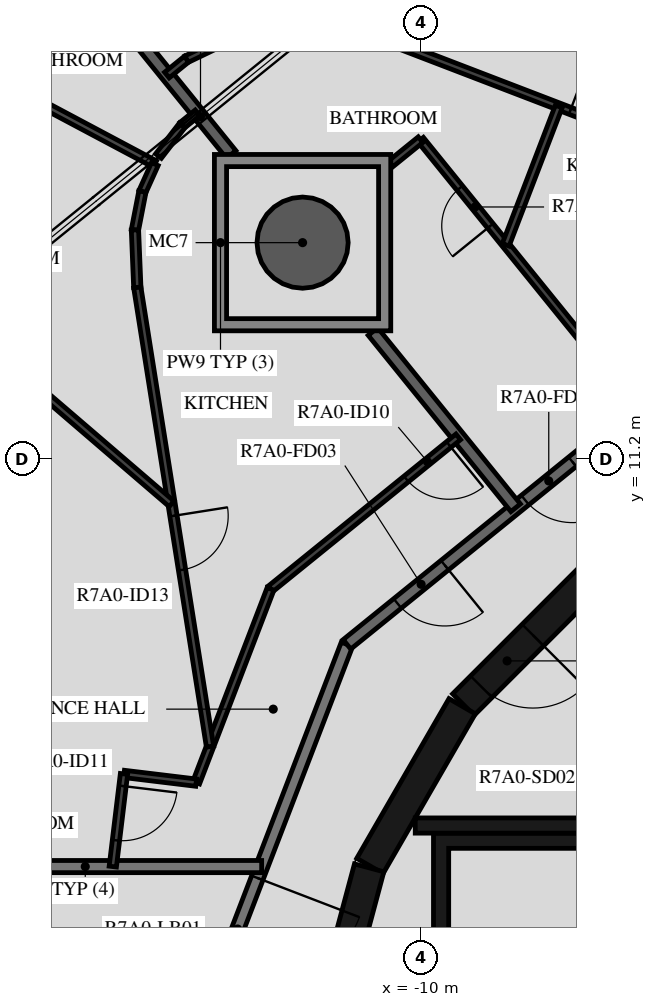
"""IFC4 building model, lengths in metres.
Left out: names, types, materials, properties, quantities, classifications, styles, units other than length and angle.
Written with IfcOpenShell. Run it as: python <this file> out.ifc"""

import sys

from ifc_helpers import new_model, si_unit, direction, frame, frame_2d, origin, origin_2d, place, context, subcontext, project, spatial, polyline, rectangle, hollow_circle, outline, extrude, element, fill, save


model = new_model("IFC4")
c1 = context("Model", 3, precision=1e-05, world=origin(), true_north=direction((0.0, 1.0)))
c2 = subcontext(c1, "Body", "Model", "MODEL_VIEW")
j1 = project(units=[si_unit("LENGTHUNIT", "METRE"), si_unit("PLANEANGLEUNIT", "RADIAN")], contexts=[c1])
p1 = place(None, origin())
s1 = spatial("IfcSite", under=j1, at=p1, CompositionType="ELEMENT")
p2 = place(p1, origin())
s2 = spatial("IfcBuilding", under=s1, at=p2, CompositionType="ELEMENT")
p3 = place(p2, frame((0.0, 0.0, 263.4)))
s3 = spatial("IfcBuildingStorey", under=s2, at=p3, CompositionType="ELEMENT", Elevation=263.4)
p4 = place(p3, frame((-11.953, 14.76, -0.45), z_axis=(0.0, 0.0, 1.0), x_axis=(1.0, 0.0, 0.0)))
e1 = element("IfcColumn", 1, at=p4, inside=s3, PredefinedType="COLUMN", context=c2, shape_type="SweptSolid", body=[
    extrude(hollow_circle(Radius=0.75, WallThickness=0.035, at=origin_2d()), origin(), (0.0, 0.0, 1.0), 3.57),
])
p5 = place(p3, frame((-7.164, 9.308, 0.0), z_axis=(0.0, 0.0, 1.0), x_axis=(-0.707106781187, -0.707106781187, 0.0)))
e2 = element("IfcWall", 2, at=p5, inside=s3, PredefinedType="SHEAR", context=c2, shape_type="SweptSolid", body=[
    extrude(rectangle(XDim=3.032, YDim=0.5, at=frame_2d((1.516, 0.0))), origin(), (0.0, 0.0, 1.0), 3.12),
])
p6 = place(p5, frame((1.416, 0.0, 0.0)))
e3 = element("IfcOpeningElement", 3, at=p6, cuts=e2, PredefinedType="OPENING", context=c2, shape_type="SweptSolid", body=[
    extrude(rectangle(XDim=1.2, YDim=2.1, at=frame_2d((0.6, 1.05))), frame((0.0, 0.26, 0.0), z_axis=(0.0, -1.0, 0.0), x_axis=(1.0, 0.0, 0.0)), (0.0, 0.0, 1.0), 0.52),
])
for number, where, z_axis, x_axis in (
    (4, (-9.329, 7.137, 0.0), (0.0, 0.0, 1.0), (-0.5, -0.866, 0.0)),
    (5, (-10.858, 4.479, 0.0), (0.0, 0.0, 1.0), (-0.259, -0.966, 0.0)),
):
    element("IfcWall", number, at=place(p3, frame(where, z_axis=z_axis, x_axis=x_axis)), inside=s3, PredefinedType="SHEAR", context=c2, shape_type="SweptSolid", body=[
        extrude(rectangle(XDim=3.033, YDim=0.5, at=frame_2d((1.516, 0.0))), origin(), (0.0, 0.0, 1.0), 3.12),
    ])
p7 = place(p3, frame((-7.0, 5.175, 0.0), z_axis=(0.0, 0.0, 1.0), x_axis=(-1.0, 0.0, 0.0)))
e6 = element("IfcWall", 6, at=p7, inside=s3, PredefinedType="SHEAR", context=c2, shape_type="SweptSolid", body=[
    extrude(rectangle(XDim=3.1, YDim=0.25, at=frame_2d((1.55, 0.0))), origin(), (0.0, 0.0, 1.0), 3.12),
])
p8 = place(p3, origin())
e7 = element("IfcWall", 7, at=p8, inside=s3, PredefinedType="SHEAR", context=c2, shape_type="SweptSolid", body=[
    extrude(outline(polyline([(-9.8, 1.9), (-9.55, 1.9), (-9.55, 4.8), (3.1, 4.8), (3.1, 1.9), (3.35, 1.9), (3.35, 4.8), (5.25, 4.8), (5.25, 1.9), (5.5, 1.9), (5.5, 4.8), (7.4, 4.8), (7.4, 1.9), (7.65, 1.9), (7.65, 4.8), (9.55, 4.8), (9.55, 1.9), (9.8, 1.9), (9.8, 4.8), (9.8, 5.05), (-9.8, 5.05), (-9.8, 4.8), (-9.8, 1.9)])), origin(), (0.0, 0.0, 1.0), 3.12),
])
p9 = place(p3, frame((-11.223, 8.154, 0.0), z_axis=(0.0, 0.0, 1.0), x_axis=(-0.358341090983, -0.93359073609, 0.0)))
e8 = element("IfcWall", 8, at=p9, inside=s3, PredefinedType="STANDARD", context=c2, shape_type="SweptSolid", body=[
    extrude(rectangle(XDim=7.181, YDim=0.2, at=frame_2d((3.59, 0.0))), origin(), (0.0, 0.0, 1.0), 3.12),
])
p10 = place(p9, frame((4.114, 0.0, 0.0)))
e9 = element("IfcOpeningElement", 9, at=p10, cuts=e8, PredefinedType="OPENING", context=c2, shape_type="SweptSolid", body=[
    extrude(rectangle(XDim=1.8, YDim=2.1, at=frame_2d((0.9, 1.05))), frame((0.0, 0.11, 0.0), z_axis=(0.0, -1.0, 0.0), x_axis=(1.0, 0.0, 0.0)), (0.0, 0.0, 1.0), 0.22),
])
p11 = place(p3, frame((-5.643, 12.673, 0.0), z_axis=(0.0, 0.0, 1.0), x_axis=(-0.777160148113, -0.629302871585, 0.0)))
e10 = element("IfcWall", 10, at=p11, inside=s3, PredefinedType="STANDARD", context=c2, shape_type="SweptSolid", body=[
    extrude(rectangle(XDim=7.181, YDim=0.2, at=frame_2d((3.59, 0.0))), origin(), (0.0, 0.0, 1.0), 3.12),
])
p12 = place(p11, frame((2.41, 0.0, 0.0)))
e11 = element("IfcOpeningElement", 11, at=p12, cuts=e10, PredefinedType="OPENING", context=c2, shape_type="SweptSolid", body=[
    extrude(rectangle(XDim=1.0, YDim=2.1, at=frame_2d((0.5, 1.05))), frame((0.0, 0.11, 0.0), z_axis=(0.0, -1.0, 0.0), x_axis=(1.0, 0.0, 0.0)), (0.0, 0.0, 1.0), 0.22),
])
p13 = place(p11, frame((5.112, 0.0, 0.0)))
e12 = element("IfcOpeningElement", 12, at=p13, cuts=e10, PredefinedType="OPENING", context=c2, shape_type="SweptSolid", body=[
    extrude(rectangle(XDim=1.0, YDim=2.1, at=frame_2d((0.5, 1.05))), frame((0.0, 0.11, 0.0), z_axis=(0.0, -1.0, 0.0), x_axis=(1.0, 0.0, 0.0)), (0.0, 0.0, 1.0), 0.22),
])
p14 = place(p3, frame((-12.626, 4.5, 0.0), z_axis=(0.0, 0.0, 1.0), x_axis=(-1.0, 0.0, 0.0)))
e13 = element("IfcWall", 13, at=p14, inside=s3, PredefinedType="STANDARD", context=c2, shape_type="SweptSolid", body=[
    extrude(rectangle(XDim=5.802, YDim=0.2, at=frame_2d((2.901, 0.0))), origin(), (0.0, 0.0, 1.0), 3.12),
])
p15 = place(p3, frame((-10.796, 13.299, 0.0), z_axis=(0.0, 0.0, 1.0), x_axis=(0.629290499381, -0.777170166301, 0.0)))
e14 = element("IfcWall", 14, at=p15, inside=s3, PredefinedType="STANDARD", context=c2, shape_type="SweptSolid", body=[
    extrude(rectangle(XDim=3.729, YDim=0.2, at=frame_2d((1.865, 0.0))), origin(), (0.0, 0.0, 1.0), 3.12),
])
p16 = place(p3, frame((-16.953, 20.936, 0.0), z_axis=(0.0, 0.0, 1.0), x_axis=(0.629331057166, -0.777137324085, 0.0)))
e15 = element("IfcWall", 15, at=p16, inside=s3, PredefinedType="STANDARD", context=c2, shape_type="SweptSolid", body=[
    extrude(rectangle(XDim=6.08, YDim=0.2, at=frame_2d((3.04, 0.0))), origin(), (0.0, 0.0, 1.0), 3.12),
])
p17 = place(p3, frame((-7.377, 13.199, 0.0), z_axis=(0.0, 0.0, 1.0), x_axis=(-0.629382670352, 0.77709552454, 0.0)))
e16 = element("IfcWall", 16, at=p17, inside=s3, PredefinedType="PARTITIONING", context=c2, shape_type="SweptSolid", body=[
    extrude(rectangle(XDim=4.188, YDim=0.12, at=frame_2d((2.094, 0.0))), origin(), (0.0, 0.0, 1.0), 3.12),
])
p18 = place(p17, frame((2.364, 0.0, 0.0)))
e17 = element("IfcOpeningElement", 17, at=p18, cuts=e16, PredefinedType="OPENING", context=c2, shape_type="SweptSolid", body=[
    extrude(rectangle(XDim=0.8, YDim=2.1, at=frame_2d((0.4, 1.05))), frame((0.0, 0.07, 0.0), z_axis=(0.0, -1.0, 0.0), x_axis=(1.0, 0.0, 0.0)), (0.0, 0.0, 1.0), 0.14),
])
p19 = place(p3, frame((-10.013, 16.454, 0.0), z_axis=(0.0, 0.0, 1.0), x_axis=(-0.777001388062, -0.629498882406, 0.0)))
e18 = element("IfcWall", 18, at=p19, inside=s3, PredefinedType="PARTITIONING", context=c2, shape_type="SweptSolid", body=[
    extrude(rectangle(XDim=0.631, YDim=0.12, at=frame_2d((0.315, 0.0))), origin(), (0.0, 0.0, 1.0), 3.12),
])
p20 = place(p3, frame((-10.289, 17.978, 0.0), z_axis=(0.0, 0.0, 1.0), x_axis=(0.933579293595, -0.358370900844, 0.0)))
e19 = element("IfcWall", 19, at=p20, inside=s3, PredefinedType="PARTITIONING", context=c2, shape_type="SweptSolid", body=[
    extrude(rectangle(XDim=8.932, YDim=0.12, at=frame_2d((4.466, 0.0))), origin(), (0.0, 0.0, 1.0), 3.12),
])
p21 = place(p20, frame((2.93, 0.0, 0.0)))
e20 = element("IfcOpeningElement", 20, at=p21, cuts=e19, PredefinedType="OPENING", context=c2, shape_type="SweptSolid", body=[
    extrude(rectangle(XDim=0.9, YDim=2.1, at=frame_2d((0.45, 1.05))), frame((0.0, 0.07, 0.0), z_axis=(0.0, -1.0, 0.0), x_axis=(1.0, 0.0, 0.0)), (0.0, 0.0, 1.0), 0.14),
])
p22 = place(p3, frame((-7.74, 17.0, 0.0), z_axis=(0.0, 0.0, 1.0), x_axis=(-0.358394723652, -0.93357014844, 0.0)))
e21 = element("IfcWall", 21, at=p22, inside=s3, PredefinedType="PARTITIONING", context=c2, shape_type="SweptSolid", body=[
    extrude(rectangle(XDim=2.436, YDim=0.12, at=frame_2d((1.218, 0.0))), origin(), (0.0, 0.0, 1.0), 3.12),
])
p23 = place(p3, frame((-13.115, 18.136, 0.0), z_axis=(0.0, 0.0, 1.0), x_axis=(-0.901385111422, -0.43301833784, 0.0)))
e22 = element("IfcWall", 22, at=p23, inside=s3, PredefinedType="PARTITIONING", context=c2, shape_type="SweptSolid", body=[
    extrude(rectangle(XDim=0.829, YDim=0.12, at=frame_2d((0.415, 0.0))), origin(), (0.0, 0.0, 1.0), 3.12),
])
p24 = place(p3, frame((-13.862, 17.777, 0.0), z_axis=(0.0, 0.0, 1.0), x_axis=(-0.776888119785, -0.629638665694, 0.0)))
e23 = element("IfcWall", 23, at=p24, inside=s3, PredefinedType="PARTITIONING", context=c2, shape_type="SweptSolid", body=[
    extrude(rectangle(XDim=0.415, YDim=0.12, at=frame_2d((0.207, 0.0))), origin(), (0.0, 0.0, 1.0), 3.12),
])
p25 = place(p3, frame((-9.393, 11.566, 0.0), z_axis=(0.0, 0.0, 1.0), x_axis=(-0.777100258587, -0.629376825205, 0.0)))
e24 = element("IfcWall", 24, at=p25, inside=s3, PredefinedType="PARTITIONING", context=c2, shape_type="SweptSolid", body=[
    extrude(rectangle(XDim=3.971, YDim=0.12, at=frame_2d((1.986, 0.0))), origin(), (0.0, 0.0, 1.0), 3.12),
])
p26 = place(p25, frame((0.2, 0.0, 0.0)))
e25 = element("IfcOpeningElement", 25, at=p26, cuts=e24, PredefinedType="OPENING", context=c2, shape_type="SweptSolid", body=[
    extrude(rectangle(XDim=0.9, YDim=2.1, at=frame_2d((0.45, 1.05))), frame((0.0, 0.07, 0.0), z_axis=(0.0, -1.0, 0.0), x_axis=(1.0, 0.0, 0.0)), (0.0, 0.0, 1.0), 0.14),
])
p27 = place(p3, frame((-12.479, 9.067, 0.0), z_axis=(0.0, 0.0, 1.0), x_axis=(-0.358394302064, -0.933570310286, 0.0)))
e26 = element("IfcWall", 26, at=p27, inside=s3, PredefinedType="PARTITIONING", context=c2, shape_type="SweptSolid", body=[
    extrude(rectangle(XDim=3.414, YDim=0.12, at=frame_2d((1.707, 0.0))), origin(), (0.0, 0.0, 1.0), 3.12),
])
p28 = place(p3, frame((-13.703, 5.88, 0.0), z_axis=(0.0, 0.0, 1.0), x_axis=(-0.992763323859, 0.120087396509, 0.0)))
e27 = element("IfcWall", 27, at=p28, inside=s3, PredefinedType="PARTITIONING", context=c2, shape_type="SweptSolid", body=[
    extrude(rectangle(XDim=1.195, YDim=0.12, at=frame_2d((0.598, 0.0))), origin(), (0.0, 0.0, 1.0), 3.12),
])
p29 = place(p3, frame((-14.89, 6.024, 0.0), z_axis=(0.0, 0.0, 1.0), x_axis=(-0.120255360044, -0.992742992109, 0.0)))
e28 = element("IfcWall", 28, at=p29, inside=s3, PredefinedType="PARTITIONING", context=c2, shape_type="SweptSolid", body=[
    extrude(rectangle(XDim=1.535, YDim=0.12, at=frame_2d((0.768, 0.0))), origin(), (0.0, 0.0, 1.0), 3.12),
])
p30 = place(p29, frame((0.2, 0.0, 0.0)))
e29 = element("IfcOpeningElement", 29, at=p30, cuts=e28, PredefinedType="OPENING", context=c2, shape_type="SweptSolid", body=[
    extrude(rectangle(XDim=0.9, YDim=2.1, at=frame_2d((0.45, 1.05))), frame((0.0, 0.07, 0.0), z_axis=(0.0, -1.0, 0.0), x_axis=(1.0, 0.0, 0.0)), (0.0, 0.0, 1.0), 0.14),
])
p31 = place(p3, frame((-14.323, 16.184, 0.0), z_axis=(0.0, 0.0, 1.0), x_axis=(0.611198506308, 0.791477343887, 0.0)))
e30 = element("IfcWall", 30, at=p31, inside=s3, PredefinedType="PARTITIONING", context=c2, shape_type="SweptSolid", body=[
    extrude(rectangle(XDim=0.642, YDim=0.12, at=frame_2d((0.321, 0.0))), origin(), (0.0, 0.0, 1.0), 3.12),
])
p32 = place(p3, frame((-13.93, 16.692, 0.0), z_axis=(0.0, 0.0, 1.0), x_axis=(0.776695397137, 0.62987638475, 0.0)))
e31 = element("IfcWall", 31, at=p32, inside=s3, PredefinedType="PARTITIONING", context=c2, shape_type="SweptSolid", body=[
    extrude(rectangle(XDim=0.321, YDim=0.12, at=frame_2d((0.161, 0.0))), origin(), (0.0, 0.0, 1.0), 3.12),
])
p33 = place(p3, frame((-18.983, 18.499, 0.0), z_axis=(0.0, 0.0, 1.0), x_axis=(0.882948840489, -0.469469216328, 0.0)))
e32 = element("IfcWall", 32, at=p33, inside=s3, PredefinedType="PARTITIONING", context=c2, shape_type="SweptSolid", body=[
    extrude(rectangle(XDim=5.211, YDim=0.12, at=frame_2d((2.605, 0.0))), origin(), (0.0, 0.0, 1.0), 2.73),
])
p34 = place(p33, frame((0.2, 0.0, 0.0)))
e33 = element("IfcOpeningElement", 33, at=p34, cuts=e32, PredefinedType="OPENING", context=c2, shape_type="SweptSolid", body=[
    extrude(rectangle(XDim=0.8, YDim=2.1, at=frame_2d((0.4, 1.05))), frame((0.0, 0.07, 0.0), z_axis=(0.0, -1.0, 0.0), x_axis=(1.0, 0.0, 0.0)), (0.0, 0.0, 1.0), 0.14),
])
p35 = place(p3, frame((-14.382, 16.052, 0.0), z_axis=(0.0, 0.0, 1.0), x_axis=(-0.412099912529, -0.911138662385, 0.0)))
e34 = element("IfcWall", 34, at=p35, inside=s3, PredefinedType="PARTITIONING", context=c2, shape_type="SweptSolid", body=[
    extrude(rectangle(XDim=0.497, YDim=0.12, at=frame_2d((0.249, 0.0))), origin(), (0.0, 0.0, 1.0), 3.12),
])
p36 = place(p3, frame((-14.587, 15.6, 0.0), z_axis=(0.0, 0.0, 1.0), x_axis=(-0.190920556667, -0.98160549155, 0.0)))
e35 = element("IfcWall", 35, at=p36, inside=s3, PredefinedType="PARTITIONING", context=c2, shape_type="SweptSolid", body=[
    extrude(rectangle(XDim=0.642, YDim=0.12, at=frame_2d((0.321, 0.0))), origin(), (0.0, 0.0, 1.0), 3.12),
])
p37 = place(p3, frame((-14.709, 14.969, 0.0), z_axis=(0.0, 0.0, 1.0), x_axis=(0.040729848009, -0.999170195453, 0.0)))
e36 = element("IfcWall", 36, at=p37, inside=s3, PredefinedType="PARTITIONING", context=c2, shape_type="SweptSolid", body=[
    extrude(rectangle(XDim=0.947, YDim=0.12, at=frame_2d((0.474, 0.0))), origin(), (0.0, 0.0, 1.0), 3.12),
])
p38 = place(p3, frame((-14.671, 14.023, 0.0), z_axis=(0.0, 0.0, 1.0), x_axis=(0.156438190471, -0.987687750538, 0.0)))
e37 = element("IfcWall", 37, at=p38, inside=s3, PredefinedType="PARTITIONING", context=c2, shape_type="SweptSolid", body=[
    extrude(rectangle(XDim=7.644, YDim=0.12, at=frame_2d((3.822, 0.0))), origin(), (0.0, 0.0, 1.0), 3.12),
])
p39 = place(p38, frame((3.803, 0.0, 0.0)))
e38 = element("IfcOpeningElement", 38, at=p39, cuts=e37, PredefinedType="OPENING", context=c2, shape_type="SweptSolid", body=[
    extrude(rectangle(XDim=0.9, YDim=2.1, at=frame_2d((0.45, 1.05))), frame((0.0, 0.07, 0.0), z_axis=(0.0, -1.0, 0.0), x_axis=(1.0, 0.0, 0.0)), (0.0, 0.0, 1.0), 0.14),
])
p40 = place(p3, frame((-19.913, 15.451, 0.0), z_axis=(0.0, 0.0, 1.0), x_axis=(0.758623462992, -0.6515293097, 0.0)))
e39 = element("IfcWall", 39, at=p40, inside=s3, PredefinedType="PARTITIONING", context=c2, shape_type="SweptSolid", body=[
    extrude(rectangle(XDim=7.653, YDim=0.12, at=frame_2d((3.826, 0.0))), origin(), (0.0, 0.0, 1.0), 3.12),
])
p41 = place(p40, frame((0.7, 0.0, 0.0)))
e40 = element("IfcOpeningElement", 40, at=p41, cuts=e39, PredefinedType="OPENING", context=c2, shape_type="SweptSolid", body=[
    extrude(rectangle(XDim=0.9, YDim=2.1, at=frame_2d((0.45, 1.05))), frame((0.0, 0.07, 0.0), z_axis=(0.0, -1.0, 0.0), x_axis=(1.0, 0.0, 0.0)), (0.0, 0.0, 1.0), 0.14),
])
p42 = place(p3, origin())
e41 = element("IfcWall", 41, at=p42, inside=s3, PredefinedType="STANDARD", context=c2, shape_type="SweptSolid", body=[
    extrude(outline(polyline([(-10.503, 16.21), (-10.503, 13.311), (-13.403, 13.311), (-13.403, 16.21), (-10.503, 16.21)]), holes=[polyline([(-13.203, 13.51), (-10.703, 13.51), (-10.703, 16.01), (-13.203, 16.01), (-13.203, 13.51)])]), origin(), (0.0, 0.0, 1.0), 3.12),
])
p43 = place(p6, origin())
e42 = element("IfcDoor", 42, at=p43, inside=s3, OperationType="SINGLE_SWING_RIGHT", PredefinedType="DOOR", context=c2, shape_type="SweptSolid", body=[
    extrude(rectangle(XDim=1.2, YDim=2.1, at=frame_2d((0.6, 1.05))), frame((0.0, 0.025, 0.0), z_axis=(0.0, -1.0, 0.0), x_axis=(1.0, 0.0, 0.0)), (0.0, 0.0, 1.0), 0.05),
])
fill(e3, e42)
p44 = place(p12, origin())
e43 = element("IfcDoor", 43, at=p44, inside=s3, OperationType="SINGLE_SWING_RIGHT", PredefinedType="DOOR", context=c2, shape_type="SweptSolid", body=[
    extrude(rectangle(XDim=1.0, YDim=2.1, at=frame_2d((0.5, 1.05))), frame((0.0, 0.025, 0.0), z_axis=(0.0, -1.0, 0.0), x_axis=(1.0, 0.0, 0.0)), (0.0, 0.0, 1.0), 0.05),
])
fill(e11, e43)
p45 = place(p18, origin())
e44 = element("IfcDoor", 44, at=p45, inside=s3, OperationType="SINGLE_SWING_RIGHT", PredefinedType="DOOR", context=c2, shape_type="SweptSolid", body=[
    extrude(rectangle(XDim=0.8, YDim=2.1, at=frame_2d((0.4, 1.05))), frame((0.0, 0.025, 0.0), z_axis=(0.0, -1.0, 0.0), x_axis=(1.0, 0.0, 0.0)), (0.0, 0.0, 1.0), 0.05),
])
fill(e17, e44)
p46 = place(p21, origin())
e45 = element("IfcDoor", 45, at=p46, inside=s3, OperationType="SINGLE_SWING_LEFT", PredefinedType="DOOR", context=c2, shape_type="SweptSolid", body=[
    extrude(rectangle(XDim=0.9, YDim=2.1, at=frame_2d((0.45, 1.05))), frame((0.0, 0.025, 0.0), z_axis=(0.0, -1.0, 0.0), x_axis=(1.0, 0.0, 0.0)), (0.0, 0.0, 1.0), 0.05),
])
fill(e20, e45)
p47 = place(p13, origin())
e46 = element("IfcDoor", 46, at=p47, inside=s3, OperationType="SINGLE_SWING_LEFT", PredefinedType="DOOR", context=c2, shape_type="SweptSolid", body=[
    extrude(rectangle(XDim=1.0, YDim=2.1, at=frame_2d((0.5, 1.05))), frame((0.0, 0.025, 0.0), z_axis=(0.0, -1.0, 0.0), x_axis=(1.0, 0.0, 0.0)), (0.0, 0.0, 1.0), 0.05),
])
fill(e12, e46)
p48 = place(p26, origin())
e47 = element("IfcDoor", 47, at=p48, inside=s3, OperationType="SINGLE_SWING_LEFT", PredefinedType="DOOR", context=c2, shape_type="SweptSolid", body=[
    extrude(rectangle(XDim=0.9, YDim=2.1, at=frame_2d((0.45, 1.05))), frame((0.0, 0.025, 0.0), z_axis=(0.0, -1.0, 0.0), x_axis=(1.0, 0.0, 0.0)), (0.0, 0.0, 1.0), 0.05),
])
fill(e25, e47)
p49 = place(p30, origin())
e48 = element("IfcDoor", 48, at=p49, inside=s3, OperationType="SINGLE_SWING_LEFT", PredefinedType="DOOR", context=c2, shape_type="SweptSolid", body=[
    extrude(rectangle(XDim=0.9, YDim=2.1, at=frame_2d((0.45, 1.05))), frame((0.0, 0.025, 0.0), z_axis=(0.0, -1.0, 0.0), x_axis=(1.0, 0.0, 0.0)), (0.0, 0.0, 1.0), 0.05),
])
fill(e29, e48)
p50 = place(p39, origin())
e49 = element("IfcDoor", 49, at=p50, inside=s3, OperationType="SINGLE_SWING_RIGHT", PredefinedType="DOOR", context=c2, shape_type="SweptSolid", body=[
    extrude(rectangle(XDim=0.9, YDim=2.1, at=frame_2d((0.45, 1.05))), frame((0.0, 0.025, 0.0), z_axis=(0.0, -1.0, 0.0), x_axis=(1.0, 0.0, 0.0)), (0.0, 0.0, 1.0), 0.05),
])
fill(e38, e49)
p51 = place(p10, origin())
e50 = element("IfcDoor", 50, at=p51, inside=s3, OperationType="DOUBLE_DOOR_SINGLE_SWING", PredefinedType="DOOR", context=c2, shape_type="SweptSolid", body=[
    extrude(rectangle(XDim=1.8, YDim=2.1, at=frame_2d((0.9, 1.05))), frame((0.0, 0.025, 0.0), z_axis=(0.0, -1.0, 0.0), x_axis=(1.0, 0.0, 0.0)), (0.0, 0.0, 1.0), 0.05),
])
fill(e9, e50)
save(model, sys.argv[1])
